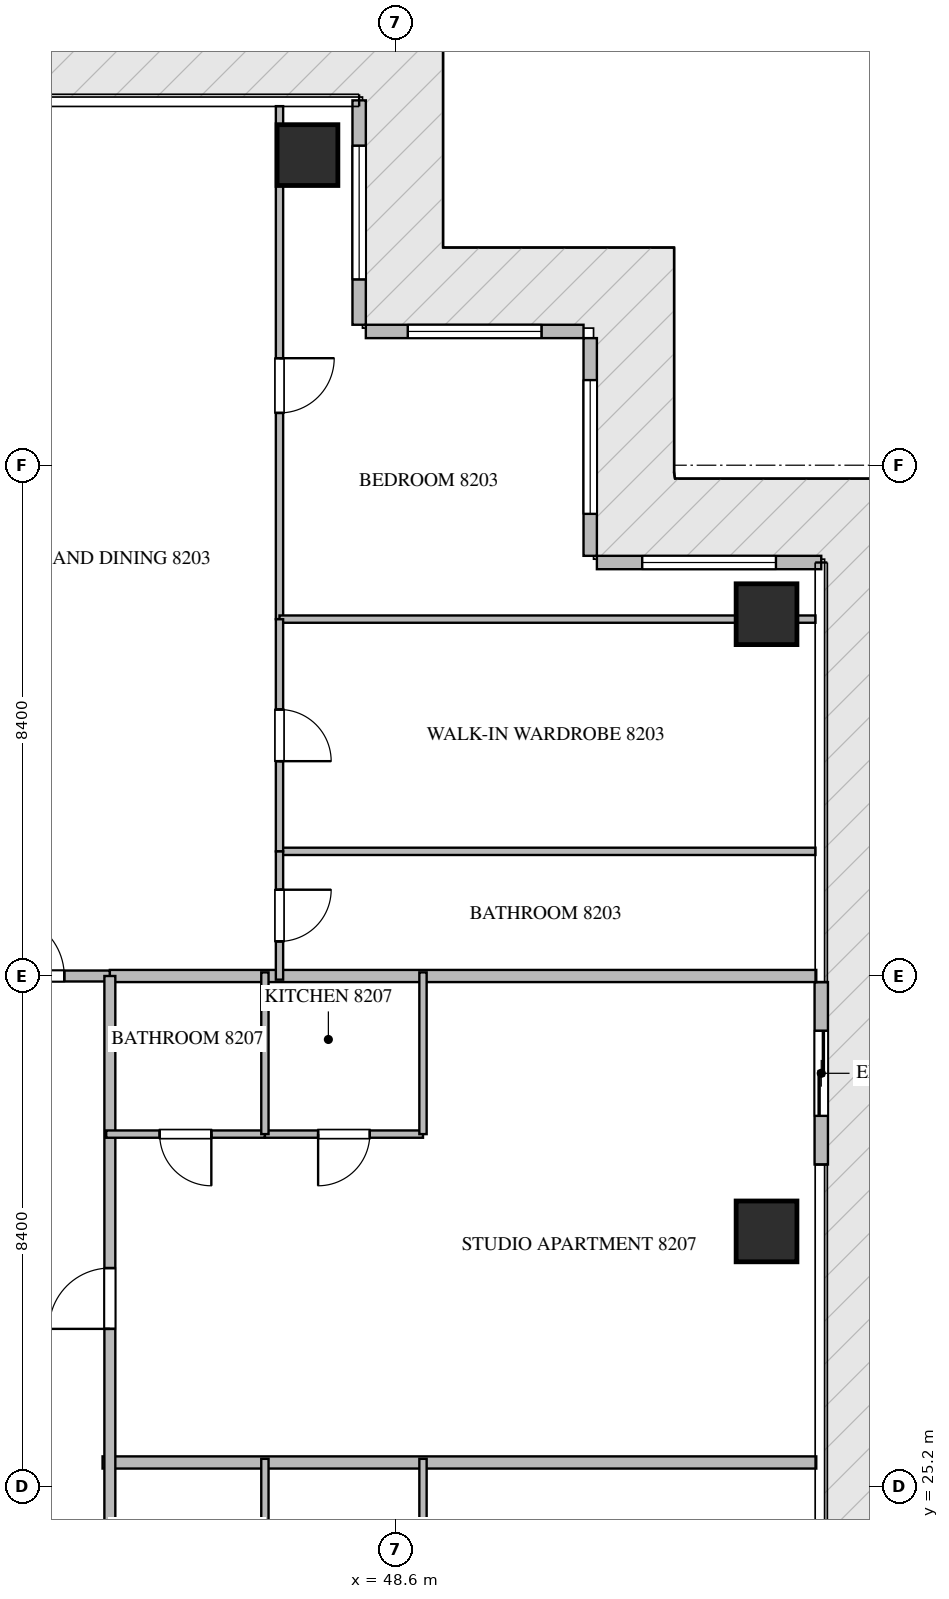
"""IFC4 building model, lengths in metres.
Left out: names, types, materials, properties, quantities, classifications, styles, units other than length and angle.
Written with IfcOpenShell. Run it as: python <this file> out.ifc"""

import sys

from ifc_helpers import new_model, si_unit, direction, frame, frame_2d, origin, origin_2d, place, context, subcontext, project, spatial, rectangle, extrude, source, transform, mapped, element, fill, save


model = new_model("IFC4")
c1 = context("Model", 3, precision=1e-05, world=origin(), true_north=direction((0.0, 1.0)))
c2 = subcontext(c1, "Body", "Model", "MODEL_VIEW")
j1 = project(units=[si_unit("LENGTHUNIT", "METRE"), si_unit("PLANEANGLEUNIT", "RADIAN")], contexts=[c1])
p1 = place(None, origin())
s1 = spatial("IfcSite", under=j1, at=p1, CompositionType="ELEMENT")
p2 = place(p1, origin())
s2 = spatial("IfcBuilding", under=s1, at=p2, CompositionType="ELEMENT")
p3 = place(p2, frame((0.0, 0.0, 329.9)))
s3 = spatial("IfcBuildingStorey", under=s2, at=p3, CompositionType="ELEMENT", Elevation=329.9)
m1 = source(origin(), c2, "Body", "SweptSolid", [
    extrude(rectangle(XDim=1.0, YDim=1.0, at=origin_2d()), origin(), (0.0, 0.0, 1.0), 4.05),
])
for number, where, z_axis, x_axis in (
    (1, (47.15, 47.1, -0.26), (0.0, 0.0, 1.0), (1.0, 0.0, 0.0)),
    (2, (54.7, 29.4, -0.26), (0.0, 0.0, 1.0), (1.0, 0.0, 0.0)),
    (3, (54.7, 39.55, -0.26), (0.0, 0.0, 1.0), (1.0, 0.0, 0.0)),
):
    element("IfcColumn", number, at=place(p3, frame(where, z_axis=z_axis, x_axis=x_axis)), inside=s3, PredefinedType="COLUMN", context=c2, shape_type="MappedRepresentation", body=[
        mapped(m1, transform((0.0, 0.0, 0.0), scale=1.0)),
    ])
p4 = place(p3, frame((55.6, 30.5, 0.0), z_axis=(0.0, 0.0, 1.0), x_axis=(0.0, 1.0, 0.0)))
e4 = element("IfcWall", 4, at=p4, inside=s3, PredefinedType="ELEMENTEDWALL", context=c2, shape_type="SweptSolid", body=[
    extrude(rectangle(XDim=3.0, YDim=0.22, at=frame_2d((1.5, 0.0))), origin(), (0.0, 0.0, 1.0), 3.775),
])
p5 = place(p4, frame((0.8, 0.0, 0.0)))
e5 = element("IfcOpeningElement", 5, at=p5, cuts=e4, PredefinedType="OPENING", context=c2, shape_type="SweptSolid", body=[
    extrude(rectangle(XDim=1.4, YDim=2.25, at=frame_2d((0.7, 1.125))), frame((0.0, 0.12, 0.0), z_axis=(0.0, -1.0, 0.0), x_axis=(1.0, 0.0, 0.0)), (0.0, 0.0, 1.0), 0.24),
])
p6 = place(p3, frame((55.6, 40.4, 0.0), z_axis=(0.0, 0.0, 1.0), x_axis=(-1.0, 0.0, 0.0)))
e6 = element("IfcWall", 6, at=p6, inside=s3, PredefinedType="ELEMENTEDWALL", context=c2, shape_type="SweptSolid", body=[
    extrude(rectangle(XDim=3.69, YDim=0.22, at=frame_2d((1.845, 0.0))), origin(), (0.0, 0.0, 1.0), 3.775),
])
p7 = place(p6, frame((0.745, 0.0, 0.65)))
e7 = element("IfcOpeningElement", 7, at=p7, cuts=e6, PredefinedType="OPENING", context=c2, shape_type="SweptSolid", body=[
    extrude(rectangle(XDim=2.2, YDim=2.4, at=frame_2d((1.1, 1.2))), frame((0.0, 0.12, 0.0), z_axis=(0.0, -1.0, 0.0), x_axis=(1.0, 0.0, 0.0)), (0.0, 0.0, 1.0), 0.24),
])
p8 = place(p3, frame((51.8, 40.51, 0.0), z_axis=(0.0, 0.0, 1.0), x_axis=(0.0, 1.0, 0.0)))
e8 = element("IfcWall", 8, at=p8, inside=s3, PredefinedType="ELEMENTEDWALL", context=c2, shape_type="SweptSolid", body=[
    extrude(rectangle(XDim=3.58, YDim=0.22, at=frame_2d((1.79, 0.0))), origin(), (0.0, 0.0, 1.0), 3.775),
])
p9 = place(p8, frame((0.69, 0.0, 0.65)))
e9 = element("IfcOpeningElement", 9, at=p9, cuts=e8, PredefinedType="OPENING", context=c2, shape_type="SweptSolid", body=[
    extrude(rectangle(XDim=2.2, YDim=2.4, at=frame_2d((1.1, 1.2))), frame((0.0, 0.12, 0.0), z_axis=(0.0, -1.0, 0.0), x_axis=(1.0, 0.0, 0.0)), (0.0, 0.0, 1.0), 0.24),
])
p10 = place(p3, frame((51.69, 44.2, 0.0), z_axis=(0.0, 0.0, 1.0), x_axis=(-1.0, 0.0, 0.0)))
e10 = element("IfcWall", 10, at=p10, inside=s3, PredefinedType="ELEMENTEDWALL", context=c2, shape_type="SweptSolid", body=[
    extrude(rectangle(XDim=3.58, YDim=0.22, at=frame_2d((1.79, 0.0))), origin(), (0.0, 0.0, 1.0), 3.775),
])
p11 = place(p10, frame((0.69, 0.0, 0.65)))
e11 = element("IfcOpeningElement", 11, at=p11, cuts=e10, PredefinedType="OPENING", context=c2, shape_type="SweptSolid", body=[
    extrude(rectangle(XDim=2.2, YDim=2.4, at=frame_2d((1.1, 1.2))), frame((0.0, 0.12, 0.0), z_axis=(0.0, -1.0, 0.0), x_axis=(1.0, 0.0, 0.0)), (0.0, 0.0, 1.0), 0.24),
])
p12 = place(p3, frame((48.0, 44.31, 0.0), z_axis=(0.0, 0.0, 1.0), x_axis=(0.0, 1.0, 0.0)))
e12 = element("IfcWall", 12, at=p12, inside=s3, PredefinedType="ELEMENTEDWALL", context=c2, shape_type="SweptSolid", body=[
    extrude(rectangle(XDim=3.69, YDim=0.22, at=frame_2d((1.845, 0.0))), origin(), (0.0, 0.0, 1.0), 3.775),
])
p13 = place(p12, frame((0.745, 0.0, 0.65)))
e13 = element("IfcOpeningElement", 13, at=p13, cuts=e12, PredefinedType="OPENING", context=c2, shape_type="SweptSolid", body=[
    extrude(rectangle(XDim=2.2, YDim=2.4, at=frame_2d((1.1, 1.2))), frame((0.0, 0.12, 0.0), z_axis=(0.0, -1.0, 0.0), x_axis=(1.0, 0.0, 0.0)), (0.0, 0.0, 1.0), 0.24),
])
p14 = place(p3, frame((43.78, 25.6, 0.0), z_axis=(0.0, 0.0, 1.0), x_axis=(1.0, 0.0, 0.0)))
e14 = element("IfcWall", 14, at=p14, inside=s3, PredefinedType="PARTITIONING", context=c2, shape_type="SweptSolid", body=[
    extrude(rectangle(XDim=11.738, YDim=0.2, at=frame_2d((5.869, 0.0))), origin(), (0.0, 0.0, 1.0), 3.79),
])
p15 = place(p3, frame((43.9, 33.6, 0.0), z_axis=(0.0, 0.0, 1.0), x_axis=(1.0, 0.0, 0.0)))
e15 = element("IfcWall", 15, at=p15, inside=s3, PredefinedType="PARTITIONING", context=c2, shape_type="SweptSolid", body=[
    extrude(rectangle(XDim=11.618, YDim=0.2, at=frame_2d((5.809, 0.0))), origin(), (0.0, 0.0, 1.0), 3.79),
])
p16 = place(p3, frame((41.402, 33.6, 0.0), z_axis=(0.0, 0.0, 1.0), x_axis=(1.0, 0.0, 0.0)))
e16 = element("IfcWall", 16, at=p16, inside=s3, PredefinedType="PARTITIONING", context=c2, shape_type="SweptSolid", body=[
    extrude(rectangle(XDim=2.496, YDim=0.18, at=frame_2d((1.248, 0.0))), origin(), (0.0, 0.0, 1.0), 3.79),
])
p17 = place(p16, frame((0.748, 0.0, 0.0)))
e17 = element("IfcOpeningElement", 17, at=p17, cuts=e16, PredefinedType="OPENING", context=c2, shape_type="SweptSolid", body=[
    extrude(rectangle(XDim=1.0, YDim=2.15, at=frame_2d((0.5, 1.075))), frame((0.0, 0.1, 0.0), z_axis=(0.0, -1.0, 0.0), x_axis=(1.0, 0.0, 0.0)), (0.0, 0.0, 1.0), 0.2),
])
p18 = place(p3, frame((43.9, 16.8, 0.0), z_axis=(0.0, 0.0, 1.0), x_axis=(0.0, 1.0, 0.0)))
e18 = element("IfcWall", 18, at=p18, inside=s3, PredefinedType="PARTITIONING", context=c2, shape_type="SweptSolid", body=[
    extrude(rectangle(XDim=16.8, YDim=0.18, at=frame_2d((8.4, 0.0))), origin(), (0.0, 0.0, 1.0), 3.79),
])
p19 = place(p18, frame((2.575, 0.0, 0.0)))
e19 = element("IfcOpeningElement", 19, at=p19, cuts=e18, PredefinedType="OPENING", context=c2, shape_type="SweptSolid", body=[
    extrude(rectangle(XDim=1.0, YDim=2.15, at=frame_2d((0.5, 1.075))), frame((0.0, 0.1, 0.0), z_axis=(0.0, -1.0, 0.0), x_axis=(1.0, 0.0, 0.0)), (0.0, 0.0, 1.0), 0.2),
])
p20 = place(p18, frame((10.997, 0.0, 0.0)))
e20 = element("IfcOpeningElement", 20, at=p20, cuts=e18, PredefinedType="OPENING", context=c2, shape_type="SweptSolid", body=[
    extrude(rectangle(XDim=1.0, YDim=2.15, at=frame_2d((0.5, 1.075))), frame((0.0, 0.1, 0.0), z_axis=(0.0, -1.0, 0.0), x_axis=(1.0, 0.0, 0.0)), (0.0, 0.0, 1.0), 0.2),
])
p21 = place(p3, frame((46.69, 47.905, 0.0), z_axis=(0.0, 0.0, 1.0), x_axis=(0.0, -1.0, 0.0)))
e21 = element("IfcWall", 21, at=p21, inside=s3, PredefinedType="PARTITIONING", context=c2, shape_type="SweptSolid", body=[
    extrude(rectangle(XDim=8.436, YDim=0.12, at=frame_2d((4.218, 0.0))), origin(), (0.0, 0.0, 1.0), 3.79),
])
p22 = place(p21, frame((4.145, 0.0, 0.0)))
e22 = element("IfcOpeningElement", 22, at=p22, cuts=e21, PredefinedType="OPENING", context=c2, shape_type="SweptSolid", body=[
    extrude(rectangle(XDim=0.9, YDim=2.1, at=frame_2d((0.45, 1.05))), frame((0.0, 0.07, 0.0), z_axis=(0.0, -1.0, 0.0), x_axis=(1.0, 0.0, 0.0)), (0.0, 0.0, 1.0), 0.14),
])
p23 = place(p3, frame((46.69, 39.469, 0.0), z_axis=(0.0, 0.0, 1.0), x_axis=(1.0, 0.0, 0.0)))
e23 = element("IfcWall", 23, at=p23, inside=s3, PredefinedType="PARTITIONING", context=c2, shape_type="SweptSolid", body=[
    extrude(rectangle(XDim=8.815, YDim=0.12, at=frame_2d((4.407, 0.0))), origin(), (0.0, 0.0, 1.0), 3.292),
])
p24 = place(p3, frame((46.69, 35.65, 0.0), z_axis=(0.0, 0.0, 1.0), x_axis=(1.0, 0.0, 0.0)))
e24 = element("IfcWall", 24, at=p24, inside=s3, PredefinedType="PARTITIONING", context=c2, shape_type="SweptSolid", body=[
    extrude(rectangle(XDim=8.815, YDim=0.12, at=frame_2d((4.407, 0.0))), origin(), (0.0, 0.0, 1.0), 3.79),
])
p25 = place(p3, frame((46.69, 39.467, 0.0), z_axis=(0.0, 0.0, 1.0), x_axis=(0.0, -1.0, 0.0)))
e25 = element("IfcWall", 25, at=p25, inside=s3, PredefinedType="PARTITIONING", context=c2, shape_type="SweptSolid", body=[
    extrude(rectangle(XDim=3.817, YDim=0.12, at=frame_2d((1.909, 0.0))), origin(), (0.0, 0.0, 1.0), 3.79),
])
p26 = place(p25, frame((1.484, 0.0, 0.0)))
e26 = element("IfcOpeningElement", 26, at=p26, cuts=e25, PredefinedType="OPENING", context=c2, shape_type="SweptSolid", body=[
    extrude(rectangle(XDim=0.85, YDim=2.1, at=frame_2d((0.425, 1.05))), frame((0.0, 0.07, 0.0), z_axis=(0.0, -1.0, 0.0), x_axis=(1.0, 0.0, 0.0)), (0.0, 0.0, 1.0), 0.14),
])
p27 = place(p3, frame((46.69, 35.648, 0.0), z_axis=(0.0, 0.0, 1.0), x_axis=(0.0, -1.0, 0.0)))
e27 = element("IfcWall", 27, at=p27, inside=s3, PredefinedType="PARTITIONING", context=c2, shape_type="SweptSolid", body=[
    extrude(rectangle(XDim=2.108, YDim=0.12, at=frame_2d((1.054, 0.0))), origin(), (0.0, 0.0, 1.0), 3.79),
])
p28 = place(p27, frame((0.629, 0.0, 0.0)))
e28 = element("IfcOpeningElement", 28, at=p28, cuts=e27, PredefinedType="OPENING", context=c2, shape_type="SweptSolid", body=[
    extrude(rectangle(XDim=0.85, YDim=2.1, at=frame_2d((0.425, 1.05))), frame((0.0, 0.07, 0.0), z_axis=(0.0, -1.0, 0.0), x_axis=(1.0, 0.0, 0.0)), (0.0, 0.0, 1.0), 0.14),
])
for number, where, z_axis, x_axis in (
    (29, (46.45, 22.85, 0.0), (0.0, 0.0, 1.0), (0.0, 1.0, 0.0)),
    (30, (49.05, 22.85, 0.0), (0.0, 0.0, 1.0), (0.0, 1.0, 0.0)),
):
    element("IfcWall", number, at=place(p3, frame(where, z_axis=z_axis, x_axis=x_axis)), inside=s3, PredefinedType="PARTITIONING", context=c2, shape_type="SweptSolid", body=[
        extrude(rectangle(XDim=2.81, YDim=0.12, at=frame_2d((1.405, 0.0))), origin(), (0.0, 0.0, 1.0), 3.79),
    ])
p29 = place(p3, frame((49.05, 31.0, 0.0), z_axis=(0.0, 0.0, 1.0), x_axis=(-1.0, 0.0, 0.0)))
e31 = element("IfcWall", 31, at=p29, inside=s3, PredefinedType="PARTITIONING", context=c2, shape_type="SweptSolid", body=[
    extrude(rectangle(XDim=2.6, YDim=0.12, at=frame_2d((1.3, 0.0))), origin(), (0.0, 0.0, 1.0), 3.79),
])
p30 = place(p29, frame((0.875, 0.0, 0.0)))
e32 = element("IfcOpeningElement", 32, at=p30, cuts=e31, PredefinedType="OPENING", context=c2, shape_type="SweptSolid", body=[
    extrude(rectangle(XDim=0.85, YDim=2.1, at=frame_2d((0.425, 1.05))), frame((0.0, 0.07, 0.0), z_axis=(0.0, -1.0, 0.0), x_axis=(1.0, 0.0, 0.0)), (0.0, 0.0, 1.0), 0.14),
])
p31 = place(p3, frame((46.448, 31.0, 0.0), z_axis=(0.0, 0.0, 1.0), x_axis=(-1.0, 0.0, 0.0)))
e33 = element("IfcWall", 33, at=p31, inside=s3, PredefinedType="PARTITIONING", context=c2, shape_type="SweptSolid", body=[
    extrude(rectangle(XDim=2.608, YDim=0.12, at=frame_2d((1.304, 0.0))), origin(), (0.0, 0.0, 1.0), 3.79),
])
p32 = place(p31, frame((0.879, 0.0, 0.0)))
e34 = element("IfcOpeningElement", 34, at=p32, cuts=e33, PredefinedType="OPENING", context=c2, shape_type="SweptSolid", body=[
    extrude(rectangle(XDim=0.85, YDim=2.1, at=frame_2d((0.425, 1.05))), frame((0.0, 0.07, 0.0), z_axis=(0.0, -1.0, 0.0), x_axis=(1.0, 0.0, 0.0)), (0.0, 0.0, 1.0), 0.14),
])
for number, where, z_axis, x_axis in (
    (35, (46.45, 31.0, 0.0), (0.0, 0.0, 1.0), (0.0, 1.0, 0.0)),
    (36, (49.05, 31.0, 0.0), (0.0, 0.0, 1.0), (0.0, 1.0, 0.0)),
):
    element("IfcWall", number, at=place(p3, frame(where, z_axis=z_axis, x_axis=x_axis)), inside=s3, PredefinedType="PARTITIONING", context=c2, shape_type="SweptSolid", body=[
        extrude(rectangle(XDim=2.66, YDim=0.12, at=frame_2d((1.33, 0.0))), origin(), (0.0, 0.0, 1.0), 3.79),
    ])
m2 = source(origin(), c2, "Body", "SweptSolid", [
    extrude(rectangle(XDim=1.4, YDim=2.25, at=frame_2d((0.7, 1.125))), frame((0.0, 0.025, 0.0), z_axis=(0.0, -1.0, 0.0), x_axis=(1.0, 0.0, 0.0)), (0.0, 0.0, 1.0), 0.05),
])
p33 = place(p5, origin())
e37 = element("IfcDoor", 37, at=p33, inside=s3, OperationType="SLIDING_TO_LEFT", PredefinedType="DOOR", context=c2, shape_type="MappedRepresentation", body=[
    mapped(m2, transform((0.0, 0.0, 0.0), scale=1.0)),
])
fill(e5, e37)
m3 = source(origin(), c2, "Body", "SweptSolid", [
    extrude(rectangle(XDim=2.2, YDim=2.4, at=frame_2d((1.1, 1.2))), frame((0.0, 0.03, 0.0), z_axis=(0.0, -1.0, 0.0), x_axis=(1.0, 0.0, 0.0)), (0.0, 0.0, 1.0), 0.06),
])
p34 = place(p7, origin())
e38 = element("IfcWindow", 38, at=p34, inside=s3, PartitioningType="SINGLE_PANEL", PredefinedType="WINDOW", context=c2, shape_type="MappedRepresentation", body=[
    mapped(m3, transform((0.0, 0.0, 0.0), scale=1.0)),
])
fill(e7, e38)
p35 = place(p9, origin())
e39 = element("IfcWindow", 39, at=p35, inside=s3, PartitioningType="SINGLE_PANEL", PredefinedType="WINDOW", context=c2, shape_type="MappedRepresentation", body=[
    mapped(m3, transform((0.0, 0.0, 0.0), scale=1.0)),
])
fill(e9, e39)
p36 = place(p11, origin())
e40 = element("IfcWindow", 40, at=p36, inside=s3, PartitioningType="SINGLE_PANEL", PredefinedType="WINDOW", context=c2, shape_type="MappedRepresentation", body=[
    mapped(m3, transform((0.0, 0.0, 0.0), scale=1.0)),
])
fill(e11, e40)
p37 = place(p13, origin())
e41 = element("IfcWindow", 41, at=p37, inside=s3, PartitioningType="SINGLE_PANEL", PredefinedType="WINDOW", context=c2, shape_type="MappedRepresentation", body=[
    mapped(m3, transform((0.0, 0.0, 0.0), scale=1.0)),
])
fill(e13, e41)
m4 = source(origin(), c2, "Body", "SweptSolid", [
    extrude(rectangle(XDim=1.0, YDim=2.15, at=frame_2d((0.5, 1.075))), frame((0.0, 0.025, 0.0), z_axis=(0.0, -1.0, 0.0), x_axis=(1.0, 0.0, 0.0)), (0.0, 0.0, 1.0), 0.05),
])
p38 = place(p17, origin())
e42 = element("IfcDoor", 42, at=p38, inside=s3, OperationType="SINGLE_SWING_LEFT", PredefinedType="DOOR", context=c2, shape_type="MappedRepresentation", body=[
    mapped(m4, transform((0.0, 0.0, 0.0), scale=1.0)),
])
fill(e17, e42)
p39 = place(p20, origin())
e43 = element("IfcDoor", 43, at=p39, inside=s3, OperationType="SINGLE_SWING_LEFT", PredefinedType="DOOR", context=c2, shape_type="MappedRepresentation", body=[
    mapped(m4, transform((0.0, 0.0, 0.0), scale=1.0)),
])
fill(e20, e43)
m5 = source(origin(), c2, "Body", "SweptSolid", [
    extrude(rectangle(XDim=0.9, YDim=2.1, at=frame_2d((0.45, 1.05))), frame((0.0, 0.025, 0.0), z_axis=(0.0, -1.0, 0.0), x_axis=(1.0, 0.0, 0.0)), (0.0, 0.0, 1.0), 0.05),
])
p40 = place(p22, origin())
e44 = element("IfcDoor", 44, at=p40, inside=s3, OperationType="SINGLE_SWING_LEFT", PredefinedType="DOOR", context=c2, shape_type="MappedRepresentation", body=[
    mapped(m5, transform((0.0, 0.0, 0.0), scale=1.0)),
])
fill(e22, e44)
m6 = source(origin(), c2, "Body", "SweptSolid", [
    extrude(rectangle(XDim=0.85, YDim=2.1, at=frame_2d((0.425, 1.05))), frame((0.0, 0.025, 0.0), z_axis=(0.0, -1.0, 0.0), x_axis=(1.0, 0.0, 0.0)), (0.0, 0.0, 1.0), 0.05),
])
p41 = place(p26, origin())
e45 = element("IfcDoor", 45, at=p41, inside=s3, OperationType="SINGLE_SWING_RIGHT", PredefinedType="DOOR", context=c2, shape_type="MappedRepresentation", body=[
    mapped(m6, transform((0.0, 0.0, 0.0), scale=1.0)),
])
fill(e26, e45)
p42 = place(p28, origin())
e46 = element("IfcDoor", 46, at=p42, inside=s3, OperationType="SINGLE_SWING_LEFT", PredefinedType="DOOR", context=c2, shape_type="MappedRepresentation", body=[
    mapped(m6, transform((0.0, 0.0, 0.0), scale=1.0)),
])
fill(e28, e46)
p43 = place(p30, origin())
e47 = element("IfcDoor", 47, at=p43, inside=s3, OperationType="SINGLE_SWING_RIGHT", PredefinedType="DOOR", context=c2, shape_type="MappedRepresentation", body=[
    mapped(m6, transform((0.0, 0.0, 0.0), scale=1.0)),
])
fill(e32, e47)
p44 = place(p32, origin())
e48 = element("IfcDoor", 48, at=p44, inside=s3, OperationType="SINGLE_SWING_LEFT", PredefinedType="DOOR", context=c2, shape_type="MappedRepresentation", body=[
    mapped(m6, transform((0.0, 0.0, 0.0), scale=1.0)),
])
fill(e34, e48)
save(model, sys.argv[1])
